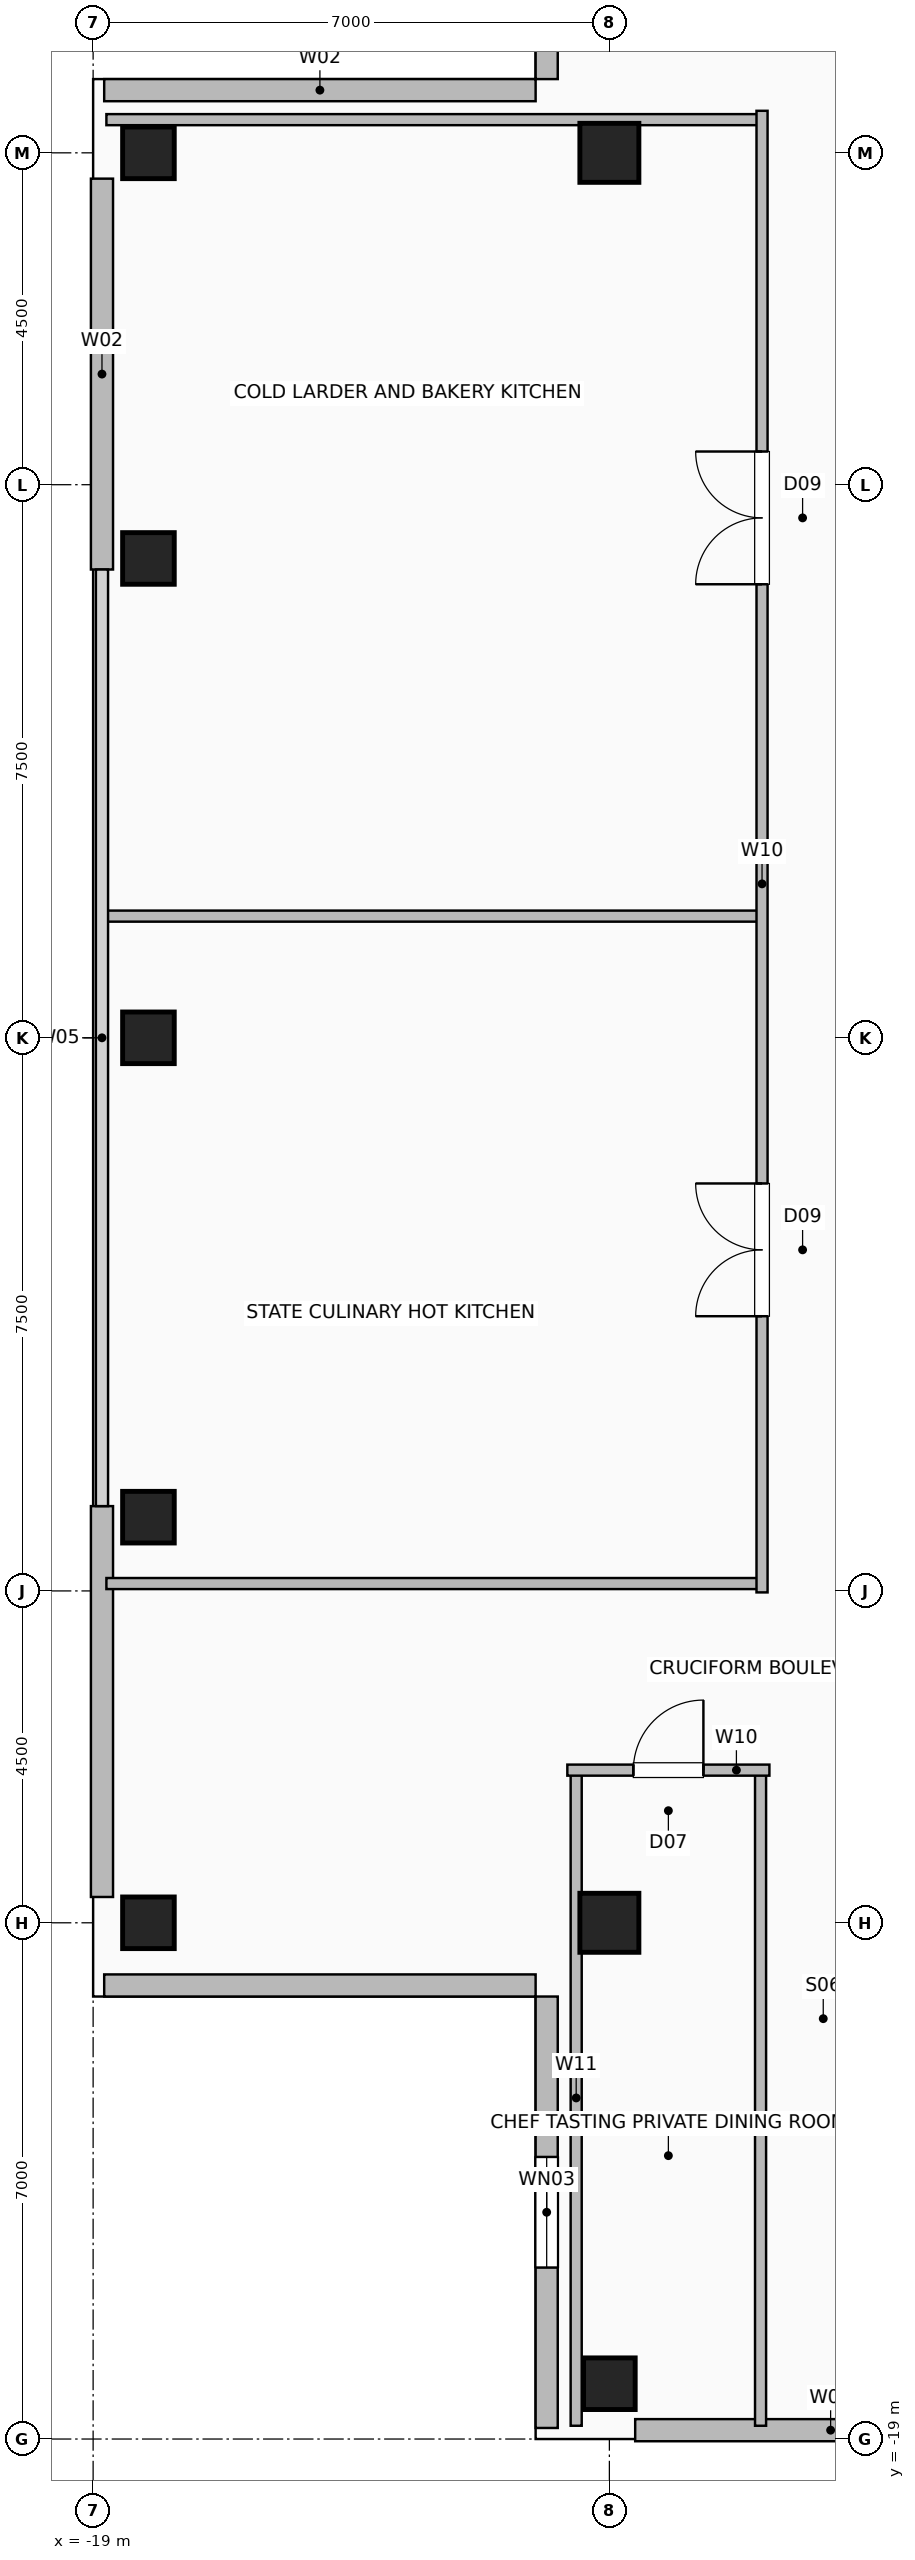
"""IFC4 building model, lengths in metres.
Left out: names, types, materials, properties, quantities, classifications, styles, units other than length and angle.
Written with IfcOpenShell. Run it as: python <this file> out.ifc"""

import sys

from ifc_helpers import new_model, si_unit, direction, frame, frame_2d, origin, origin_2d, place, context, subcontext, project, spatial, rectangle, hollow_rectangle, extrude, element, fill, save


model = new_model("IFC4")
c1 = context("Model", 3, precision=1e-05, world=origin(), true_north=direction((0.0, 1.0)))
c2 = subcontext(c1, "Body", "Model", "MODEL_VIEW")
j1 = project(units=[si_unit("LENGTHUNIT", "METRE"), si_unit("PLANEANGLEUNIT", "RADIAN")], contexts=[c1])
p1 = place(None, origin())
s1 = spatial("IfcSite", under=j1, at=p1, CompositionType="ELEMENT")
p2 = place(p1, origin())
s2 = spatial("IfcBuilding", under=s1, at=p2, CompositionType="ELEMENT")
p3 = place(p2, frame((0.0, 0.0, 257.6)))
s3 = spatial("IfcBuildingStorey", under=s2, at=p3, CompositionType="ELEMENT", Elevation=257.6)
for number, where, z_axis, x_axis in (
    (1, (-12.0, -18.25, 0.0), (0.0, 0.0, 1.0), (1.0, 0.0, 0.0)),
    (2, (-18.25, -12.0, 0.0), (0.0, 0.0, 1.0), (1.0, 0.0, 0.0)),
    (3, (-18.25, -6.5, 0.0), (0.0, 0.0, 1.0), (1.0, 0.0, 0.0)),
    (4, (-18.25, 0.0, 0.0), (0.0, 0.0, 1.0), (1.0, 0.0, 0.0)),
    (5, (-18.25, 6.5, 0.0), (0.0, 0.0, 1.0), (1.0, 0.0, 0.0)),
    (6, (-18.25, 12.0, 0.0), (0.0, 0.0, 1.0), (1.0, 0.0, 0.0)),
):
    element("IfcColumn", number, at=place(p3, frame(where, z_axis=z_axis, x_axis=x_axis)), inside=s3, PredefinedType="COLUMN", context=c2, shape_type="SweptSolid", body=[
        extrude(hollow_rectangle(XDim=0.7, YDim=0.7, WallThickness=0.035, at=origin_2d()), origin(), (0.0, 0.0, 1.0), 3.6),
    ])
for number, where, z_axis, x_axis in (
    (7, (-12.0, -12.0, 0.0), (0.0, 0.0, 1.0), (1.0, 0.0, 0.0)),
    (8, (-12.0, 12.0, 0.0), (0.0, 0.0, 1.0), (1.0, 0.0, 0.0)),
):
    element("IfcColumn", number, at=place(p3, frame(where, z_axis=z_axis, x_axis=x_axis)), inside=s3, PredefinedType="COLUMN", context=c2, shape_type="SweptSolid", body=[
        extrude(hollow_rectangle(XDim=0.8, YDim=0.8, WallThickness=0.04, at=origin_2d()), origin(), (0.0, 0.0, 1.0), 3.6),
    ])
for number, where, z_axis, x_axis in (
    (9, (-11.65, -18.88, 0.0), (0.0, 0.0, 1.0), (1.0, 0.0, 0.0)),
    (10, (-18.88, -11.65, 0.0), (0.0, 0.0, 1.0), (0.0, 1.0, 0.0)),
    (11, (-18.88, 6.35, 0.0), (0.0, 0.0, 1.0), (0.0, 1.0, 0.0)),
):
    element("IfcWall", number, at=place(p3, frame(where, z_axis=z_axis, x_axis=x_axis)), inside=s3, PredefinedType="SOLIDWALL", context=c2, shape_type="SweptSolid", body=[
        extrude(rectangle(XDim=5.3, YDim=0.3, at=frame_2d((2.65, 0.0))), origin(), (0.0, 0.0, 1.0), 3.36),
    ])
p4 = place(p3, frame((-12.85, -18.85, 0.0), z_axis=(0.0, 0.0, 1.0), x_axis=(0.0, 1.0, 0.0)))
e12 = element("IfcWall", 12, at=p4, inside=s3, PredefinedType="SOLIDWALL", context=c2, shape_type="SweptSolid", body=[
    extrude(rectangle(XDim=5.85, YDim=0.3, at=frame_2d((2.925, 0.0))), origin(), (0.0, 0.0, 1.0), 3.36),
])
p5 = place(p4, frame((2.175, 0.0, 0.9)))
e13 = element("IfcOpeningElement", 13, at=p5, cuts=e12, PredefinedType="OPENING", context=c2, shape_type="SweptSolid", body=[
    extrude(rectangle(XDim=1.5, YDim=1.8, at=frame_2d((0.75, 0.9))), frame((0.0, 0.16, 0.0), z_axis=(0.0, -1.0, 0.0), x_axis=(1.0, 0.0, 0.0)), (0.0, 0.0, 1.0), 0.32),
])
p6 = place(p3, frame((-18.85, -12.85, 0.0), z_axis=(0.0, 0.0, 1.0), x_axis=(1.0, 0.0, 0.0)))
e14 = element("IfcWall", 14, at=p6, inside=s3, PredefinedType="SOLIDWALL", context=c2, shape_type="SweptSolid", body=[
    extrude(rectangle(XDim=5.85, YDim=0.3, at=frame_2d((2.925, 0.0))), origin(), (0.0, 0.0, 1.0), 3.36),
])
p7 = place(p3, frame((-12.85, 18.85, 0.0), z_axis=(0.0, 0.0, 1.0), x_axis=(0.0, -1.0, 0.0)))
e15 = element("IfcWall", 15, at=p7, inside=s3, PredefinedType="SOLIDWALL", context=c2, shape_type="SweptSolid", body=[
    extrude(rectangle(XDim=5.85, YDim=0.3, at=frame_2d((2.925, 0.0))), origin(), (0.0, 0.0, 1.0), 3.36),
])
p8 = place(p7, frame((2.175, 0.0, 0.9)))
e16 = element("IfcOpeningElement", 16, at=p8, cuts=e15, PredefinedType="OPENING", context=c2, shape_type="SweptSolid", body=[
    extrude(rectangle(XDim=1.5, YDim=1.8, at=frame_2d((0.75, 0.9))), frame((0.0, 0.16, 0.0), z_axis=(0.0, -1.0, 0.0), x_axis=(1.0, 0.0, 0.0)), (0.0, 0.0, 1.0), 0.32),
])
p9 = place(p3, frame((-18.85, 12.85, 0.0), z_axis=(0.0, 0.0, 1.0), x_axis=(1.0, 0.0, 0.0)))
e17 = element("IfcWall", 17, at=p9, inside=s3, PredefinedType="SOLIDWALL", context=c2, shape_type="SweptSolid", body=[
    extrude(rectangle(XDim=5.85, YDim=0.3, at=frame_2d((2.925, 0.0))), origin(), (0.0, 0.0, 1.0), 3.36),
])
for number, where, z_axis, x_axis in (
    (18, (-12.45, -18.82, 0.0), (0.0, 0.0, 1.0), (0.0, 1.0, 0.0)),
    (19, (-9.95, -18.82, 0.0), (0.0, 0.0, 1.0), (0.0, 1.0, 0.0)),
):
    element("IfcWall", number, at=place(p3, frame(where, z_axis=z_axis, x_axis=x_axis)), inside=s3, PredefinedType="PARTITIONING", context=c2, shape_type="SweptSolid", body=[
        extrude(rectangle(XDim=8.89, YDim=0.15, at=frame_2d((4.445, 0.0))), origin(), (0.0, 0.0, 1.0), 3.36),
    ])
p10 = place(p3, frame((-12.57, -9.93, 0.0), z_axis=(0.0, 0.0, 1.0), x_axis=(1.0, 0.0, 0.0)))
e20 = element("IfcWall", 20, at=p10, inside=s3, PredefinedType="PARTITIONING", context=c2, shape_type="SweptSolid", body=[
    extrude(rectangle(XDim=2.74, YDim=0.15, at=frame_2d((1.37, 0.0))), origin(), (0.0, 0.0, 1.0), 3.36),
])
p11 = place(p10, frame((0.895, 0.0, 0.0)))
e21 = element("IfcOpeningElement", 21, at=p11, cuts=e20, PredefinedType="OPENING", context=c2, shape_type="SweptSolid", body=[
    extrude(rectangle(XDim=0.95, YDim=2.06, at=frame_2d((0.475, 1.03))), frame((0.0, 0.085, 0.0), z_axis=(0.0, -1.0, 0.0), x_axis=(1.0, 0.0, 0.0)), (0.0, 0.0, 1.0), 0.17),
])
for number, where, z_axis, x_axis in (
    (22, (-18.82, -7.4, 0.0), (0.0, 0.0, 1.0), (1.0, 0.0, 0.0)),
    (23, (-18.82, 1.65, 0.0), (0.0, 0.0, 1.0), (1.0, 0.0, 0.0)),
    (24, (-18.82, 12.45, 0.0), (0.0, 0.0, 1.0), (1.0, 0.0, 0.0)),
):
    element("IfcWall", number, at=place(p3, frame(where, z_axis=z_axis, x_axis=x_axis)), inside=s3, PredefinedType="PARTITIONING", context=c2, shape_type="SweptSolid", body=[
        extrude(rectangle(XDim=8.89, YDim=0.15, at=frame_2d((4.445, 0.0))), origin(), (0.0, 0.0, 1.0), 3.36),
    ])
p12 = place(p3, frame((-9.93, -7.52, 0.0), z_axis=(0.0, 0.0, 1.0), x_axis=(0.0, 1.0, 0.0)))
e25 = element("IfcWall", 25, at=p12, inside=s3, PredefinedType="PARTITIONING", context=c2, shape_type="SweptSolid", body=[
    extrude(rectangle(XDim=20.09, YDim=0.15, at=frame_2d((10.045, 0.0))), origin(), (0.0, 0.0, 1.0), 3.36),
])
p13 = place(p12, frame((3.745, 0.0, 0.0)))
e26 = element("IfcOpeningElement", 26, at=p13, cuts=e25, PredefinedType="OPENING", context=c2, shape_type="SweptSolid", body=[
    extrude(rectangle(XDim=1.8, YDim=2.08, at=frame_2d((0.9, 1.04))), frame((0.0, 0.085, 0.0), z_axis=(0.0, -1.0, 0.0), x_axis=(1.0, 0.0, 0.0)), (0.0, 0.0, 1.0), 0.17),
])
p14 = place(p12, frame((13.67, 0.0, 0.0)))
e27 = element("IfcOpeningElement", 27, at=p14, cuts=e25, PredefinedType="OPENING", context=c2, shape_type="SweptSolid", body=[
    extrude(rectangle(XDim=1.8, YDim=2.08, at=frame_2d((0.9, 1.04))), frame((0.0, 0.085, 0.0), z_axis=(0.0, -1.0, 0.0), x_axis=(1.0, 0.0, 0.0)), (0.0, 0.0, 1.0), 0.17),
])
p15 = place(p5, origin())
e28 = element("IfcWindow", 28, at=p15, inside=s3, PartitioningType="SINGLE_PANEL", PredefinedType="WINDOW", context=c2, shape_type="SweptSolid", body=[
    extrude(rectangle(XDim=1.5, YDim=1.8, at=frame_2d((0.75, 0.9))), frame((0.0, 0.03, 0.0), z_axis=(0.0, -1.0, 0.0), x_axis=(1.0, 0.0, 0.0)), (0.0, 0.0, 1.0), 0.06),
])
fill(e13, e28)
p16 = place(p11, origin())
e29 = element("IfcDoor", 29, at=p16, inside=s3, OperationType="SINGLE_SWING_RIGHT", PredefinedType="DOOR", context=c2, shape_type="SweptSolid", body=[
    extrude(rectangle(XDim=0.95, YDim=2.06, at=frame_2d((0.475, 1.03))), frame((0.0, 0.025, 0.0), z_axis=(0.0, -1.0, 0.0), x_axis=(1.0, 0.0, 0.0)), (0.0, 0.0, 1.0), 0.05),
])
fill(e21, e29)
p17 = place(p13, origin())
e30 = element("IfcDoor", 30, at=p17, inside=s3, OperationType="DOUBLE_DOOR_SINGLE_SWING", PredefinedType="DOOR", context=c2, shape_type="SweptSolid", body=[
    extrude(rectangle(XDim=1.8, YDim=2.08, at=frame_2d((0.9, 1.04))), frame((0.0, 0.025, 0.0), z_axis=(0.0, -1.0, 0.0), x_axis=(1.0, 0.0, 0.0)), (0.0, 0.0, 1.0), 0.05),
])
fill(e26, e30)
p18 = place(p14, origin())
e31 = element("IfcDoor", 31, at=p18, inside=s3, OperationType="DOUBLE_DOOR_SINGLE_SWING", PredefinedType="DOOR", context=c2, shape_type="SweptSolid", body=[
    extrude(rectangle(XDim=1.8, YDim=2.08, at=frame_2d((0.9, 1.04))), frame((0.0, 0.025, 0.0), z_axis=(0.0, -1.0, 0.0), x_axis=(1.0, 0.0, 0.0)), (0.0, 0.0, 1.0), 0.05),
])
fill(e27, e31)
save(model, sys.argv[1])
